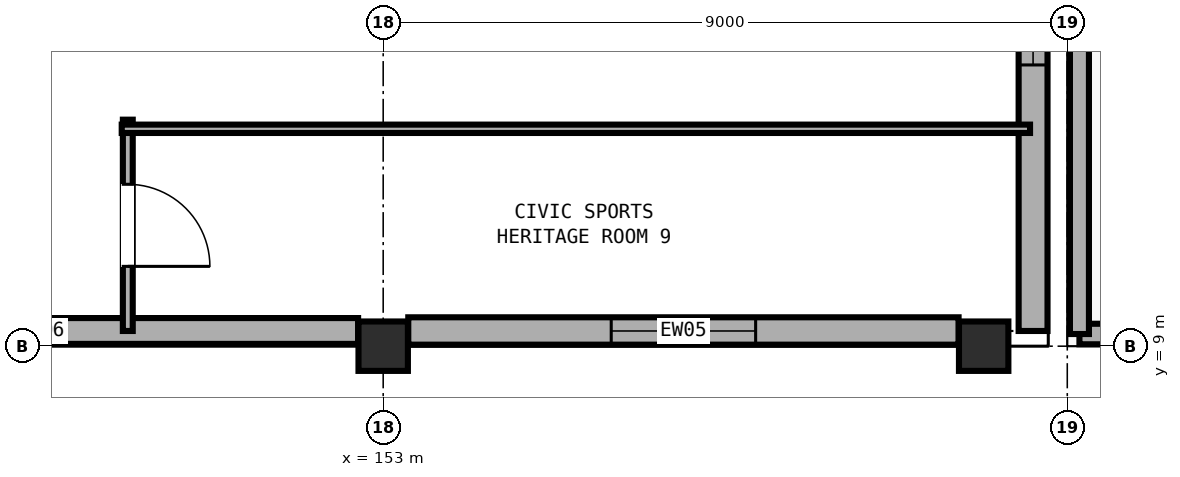
"""IFC4 building model, lengths in metres.
Left out: names, types, materials, properties, quantities, classifications, styles, units other than length and angle.
Written with IfcOpenShell. Run it as: python <this file> out.ifc"""

import sys

from ifc_helpers import new_model, si_unit, direction, frame, frame_2d, origin, origin_2d, place, context, subcontext, project, spatial, rectangle, extrude, element, fill, save


model = new_model("IFC4")
c1 = context("Model", 3, precision=1e-05, world=origin(), true_north=direction((0.0, 1.0)))
c2 = subcontext(c1, "Body", "Model", "MODEL_VIEW")
j1 = project(units=[si_unit("LENGTHUNIT", "METRE"), si_unit("PLANEANGLEUNIT", "RADIAN")], contexts=[c1])
p1 = place(None, origin())
s1 = spatial("IfcSite", under=j1, at=p1, CompositionType="ELEMENT")
p2 = place(p1, origin())
s2 = spatial("IfcBuilding", under=s1, at=p2, CompositionType="ELEMENT")
p3 = place(p2, frame((0.0, 0.0, 14.4)))
s3 = spatial("IfcBuildingStorey", under=s2, at=p3, CompositionType="ELEMENT", Elevation=14.4)
for number, where, z_axis, x_axis in (
    (1, (153.0, 9.0, 0.0), (0.0, 0.0, 1.0), (1.0, 0.0, 0.0)),
    (2, (160.9, 9.0, 0.0), (0.0, 0.0, 1.0), (1.0, 0.0, 0.0)),
):
    element("IfcColumn", number, at=place(p3, frame(where, z_axis=z_axis, x_axis=x_axis)), inside=s3, PredefinedType="COLUMN", context=c2, shape_type="SweptSolid", body=[
        extrude(rectangle(XDim=0.65, YDim=0.65, at=origin_2d()), origin(), (0.0, 0.0, 1.0), 4.8),
    ])
p4 = place(p3, frame((161.55, 18.0, 0.0), z_axis=(0.0, 0.0, 1.0), x_axis=(0.0, -1.0, 0.0)))
e3 = element("IfcWall", 3, at=p4, inside=s3, PredefinedType="SOLIDWALL", context=c2, shape_type="SweptSolid", body=[
    extrude(rectangle(XDim=8.8, YDim=0.38, at=frame_2d((4.4, 0.0))), origin(), (0.0, 0.0, 1.0), 3.58),
])
p5 = place(p4, frame((3.5, 0.0, 0.9)))
e4 = element("IfcOpeningElement", 4, at=p5, cuts=e3, PredefinedType="OPENING", context=c2, shape_type="SweptSolid", body=[
    extrude(rectangle(XDim=1.8, YDim=1.75, at=frame_2d((0.9, 0.875))), frame((0.0, 0.2, 0.0), z_axis=(0.0, -1.0, 0.0), x_axis=(1.0, 0.0, 0.0)), (0.0, 0.0, 1.0), 0.4),
])
p6 = place(p3, frame((160.57, 9.2, 0.0), z_axis=(0.0, 0.0, 1.0), x_axis=(-1.0, 0.0, 0.0)))
e5 = element("IfcWall", 5, at=p6, inside=s3, PredefinedType="SOLIDWALL", context=c2, shape_type="SweptSolid", body=[
    extrude(rectangle(XDim=7.24, YDim=0.36, at=frame_2d((3.62, 0.0))), origin(), (0.0, 0.0, 1.0), 3.58),
])
p7 = place(p6, frame((2.67, 0.0, 0.9)))
e6 = element("IfcOpeningElement", 6, at=p7, cuts=e5, PredefinedType="OPENING", context=c2, shape_type="SweptSolid", body=[
    extrude(rectangle(XDim=1.9, YDim=1.8, at=frame_2d((0.95, 0.9))), frame((0.0, 0.19, 0.0), z_axis=(0.0, -1.0, 0.0), x_axis=(1.0, 0.0, 0.0)), (0.0, 0.0, 1.0), 0.38),
])
p8 = place(p3, frame((152.67, 9.2, 0.0), z_axis=(0.0, 0.0, 1.0), x_axis=(-1.0, 0.0, 0.0)))
e7 = element("IfcWall", 7, at=p8, inside=s3, PredefinedType="SOLIDWALL", context=c2, shape_type="SweptSolid", body=[
    extrude(rectangle(XDim=8.34, YDim=0.34, at=frame_2d((4.17, 0.0))), origin(), (0.0, 0.0, 1.0), 3.58),
])
p9 = place(p8, frame((4.6, 0.0, 0.9)))
e8 = element("IfcOpeningElement", 8, at=p9, cuts=e7, PredefinedType="OPENING", context=c2, shape_type="SweptSolid", body=[
    extrude(rectangle(XDim=2.0, YDim=1.85, at=frame_2d((1.0, 0.925))), frame((0.0, 0.18, 0.0), z_axis=(0.0, -1.0, 0.0), x_axis=(1.0, 0.0, 0.0)), (0.0, 0.0, 1.0), 0.36),
])
p10 = place(p3, frame((179.34, 9.16, 0.0), z_axis=(0.0, 0.0, 1.0), x_axis=(-1.0, 0.0, 0.0)))
e9 = element("IfcWall", 9, at=p10, inside=s3, PredefinedType="PARAPET", context=c2, shape_type="SweptSolid", body=[
    extrude(rectangle(XDim=17.18, YDim=0.27, at=frame_2d((8.59, 0.0))), origin(), (0.0, 0.0, 1.0), 0.65),
])
p11 = place(p3, frame((162.16, 9.16, 0.0), z_axis=(0.0, 0.0, 1.0), x_axis=(0.0, 1.0, 0.0)))
e10 = element("IfcWall", 10, at=p11, inside=s3, PredefinedType="PARAPET", context=c2, shape_type="SweptSolid", body=[
    extrude(rectangle(XDim=26.68, YDim=0.25, at=frame_2d((13.34, 0.0))), origin(), (0.0, 0.0, 1.0), 0.65),
])
p12 = place(p3, frame((149.64, 11.98, 0.0), z_axis=(0.0, 0.0, 1.0), x_axis=(0.0, -1.0, 0.0)))
e11 = element("IfcWall", 11, at=p12, inside=s3, PredefinedType="PARTITIONING", context=c2, shape_type="SweptSolid", body=[
    extrude(rectangle(XDim=2.78, YDim=0.13, at=frame_2d((1.39, 0.0))), origin(), (0.0, 0.0, 1.0), 3.56),
])
p13 = place(p12, frame((0.85, 0.0, 0.0)))
e12 = element("IfcOpeningElement", 12, at=p13, cuts=e11, PredefinedType="OPENING", context=c2, shape_type="SweptSolid", body=[
    extrude(rectangle(XDim=1.08, YDim=2.18, at=frame_2d((0.54, 1.09))), frame((0.0, 0.075, 0.0), z_axis=(0.0, -1.0, 0.0), x_axis=(1.0, 0.0, 0.0)), (0.0, 0.0, 1.0), 0.15),
])
p14 = place(p3, frame((149.56, 11.86, 0.0), z_axis=(0.0, 0.0, 1.0), x_axis=(1.0, 0.0, 0.0)))
e13 = element("IfcWall", 13, at=p14, inside=s3, PredefinedType="PARTITIONING", context=c2, shape_type="SweptSolid", body=[
    extrude(rectangle(XDim=11.95, YDim=0.11, at=frame_2d((5.975, 0.0))), origin(), (0.0, 0.0, 1.0), 3.56),
])
p15 = place(p5, origin())
e14 = element("IfcWindow", 14, at=p15, inside=s3, PartitioningType="DOUBLE_PANEL_VERTICAL", PredefinedType="WINDOW", context=c2, shape_type="SweptSolid", body=[
    extrude(rectangle(XDim=1.8, YDim=1.75, at=frame_2d((0.9, 0.875))), frame((0.0, 0.03, 0.0), z_axis=(0.0, -1.0, 0.0), x_axis=(1.0, 0.0, 0.0)), (0.0, 0.0, 1.0), 0.06),
])
fill(e4, e14)
p16 = place(p7, origin())
e15 = element("IfcWindow", 15, at=p16, inside=s3, PartitioningType="DOUBLE_PANEL_VERTICAL", PredefinedType="WINDOW", context=c2, shape_type="SweptSolid", body=[
    extrude(rectangle(XDim=1.9, YDim=1.8, at=frame_2d((0.95, 0.9))), frame((0.0, 0.03, 0.0), z_axis=(0.0, -1.0, 0.0), x_axis=(1.0, 0.0, 0.0)), (0.0, 0.0, 1.0), 0.06),
])
fill(e6, e15)
p17 = place(p13, origin())
e16 = element("IfcDoor", 16, at=p17, inside=s3, OperationType="SINGLE_SWING_RIGHT", PredefinedType="DOOR", context=c2, shape_type="SweptSolid", body=[
    extrude(rectangle(XDim=1.08, YDim=2.18, at=frame_2d((0.54, 1.09))), frame((0.0, 0.025, 0.0), z_axis=(0.0, -1.0, 0.0), x_axis=(1.0, 0.0, 0.0)), (0.0, 0.0, 1.0), 0.05),
])
fill(e12, e16)
save(model, sys.argv[1])
